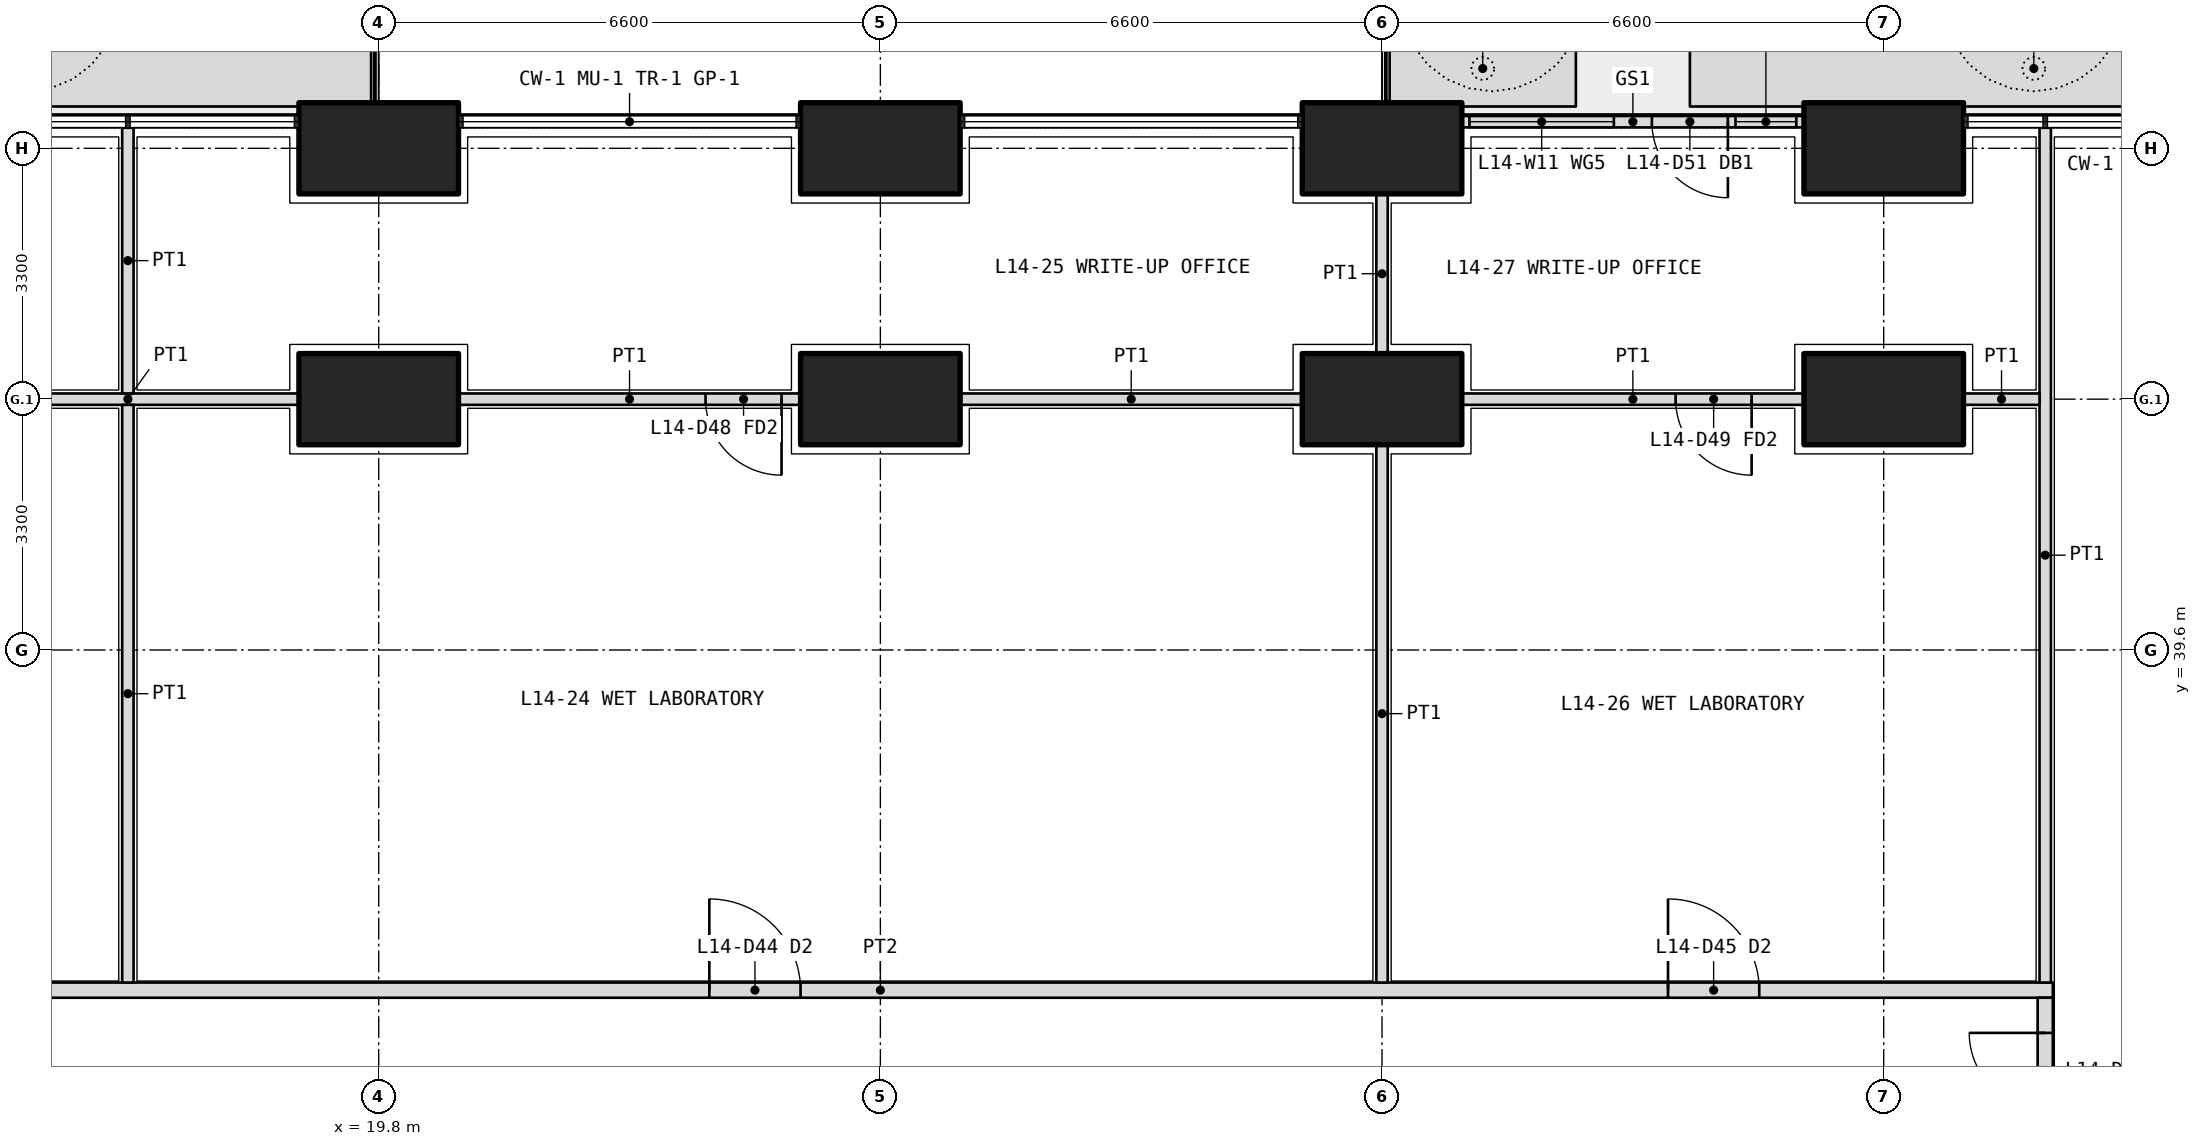
"""IFC4 building model, lengths in metres.
Left out: names, types, materials, properties, quantities, classifications, styles, units other than length and angle.
Written with IfcOpenShell. Run it as: python <this file> out.ifc"""

import sys

from ifc_helpers import new_model, si_unit, direction, frame, frame_2d, origin, origin_2d, place, context, subcontext, project, spatial, polyline, rectangle, outline, extrude, element, fill, save


model = new_model("IFC4")
c1 = context("Model", 3, precision=1e-05, world=origin(), true_north=direction((0.0, 1.0)))
c2 = subcontext(c1, "Body", "Model", "MODEL_VIEW")
j1 = project(units=[si_unit("LENGTHUNIT", "METRE"), si_unit("PLANEANGLEUNIT", "RADIAN")], contexts=[c1])
p1 = place(None, origin())
s1 = spatial("IfcSite", under=j1, at=p1, CompositionType="ELEMENT")
p2 = place(p1, origin())
s2 = spatial("IfcBuilding", under=s1, at=p2, CompositionType="ELEMENT")
p3 = place(p2, frame((0.0, 0.0, 63.3)))
s3 = spatial("IfcBuildingStorey", under=s2, at=p3, CompositionType="ELEMENT", Elevation=63.3)
for number, where, z_axis, x_axis in (
    (1, (19.8, 46.2, 0.0), (0.0, 0.0, 1.0), (1.0, 0.0, 0.0)),
    (2, (26.4, 46.2, 0.0), (0.0, 0.0, 1.0), (1.0, 0.0, 0.0)),
    (3, (33.0, 46.2, 0.0), (0.0, 0.0, 1.0), (1.0, 0.0, 0.0)),
    (4, (39.6, 46.2, 0.0), (0.0, 0.0, 1.0), (1.0, 0.0, 0.0)),
    (5, (19.8, 42.9, 0.0), (0.0, 0.0, 1.0), (1.0, 0.0, 0.0)),
    (6, (26.4, 42.9, 0.0), (0.0, 0.0, 1.0), (1.0, 0.0, 0.0)),
    (7, (33.0, 42.9, 0.0), (0.0, 0.0, 1.0), (1.0, 0.0, 0.0)),
    (8, (39.6, 42.9, 0.0), (0.0, 0.0, 1.0), (1.0, 0.0, 0.0)),
):
    element("IfcColumn", number, at=place(p3, frame(where, z_axis=z_axis, x_axis=x_axis)), inside=s3, PredefinedType="COLUMN", context=c2, shape_type="SweptSolid", body=[
        extrude(rectangle(XDim=2.1, YDim=1.2, at=origin_2d()), origin(), (0.0, 0.0, 1.0), 4.2),
    ])
p4 = place(p3, origin())
e9 = element("IfcWall", 9, at=p4, inside=s3, PredefinedType="USERDEFINED", context=c2, shape_type="SweptSolid", body=[
    extrude(outline(polyline([(10.65, 46.75), (19.7, 46.75), (19.7, 47.75), (10.65, 47.75), (10.65, 46.75)]), holes=[polyline([(10.8, 46.9), (19.55, 46.9), (19.55, 47.6), (10.8, 47.6), (10.8, 46.9)])]), origin(), (0.0, 0.0, 1.0), 1.05),
])
p5 = place(p3, origin())
e10 = element("IfcWall", 10, at=p5, inside=s3, PredefinedType="USERDEFINED", context=c2, shape_type="SweptSolid", body=[
    extrude(outline(polyline([(33.1, 46.75), (35.55, 46.75), (35.55, 47.75), (33.1, 47.75), (33.1, 46.75)]), holes=[polyline([(33.25, 46.9), (35.4, 46.9), (35.4, 47.6), (33.25, 47.6), (33.25, 46.9)])]), origin(), (0.0, 0.0, 1.0), 1.05),
])
p6 = place(p3, origin())
e11 = element("IfcWall", 11, at=p6, inside=s3, PredefinedType="USERDEFINED", context=c2, shape_type="SweptSolid", body=[
    extrude(outline(polyline([(37.05, 46.75), (46.1, 46.75), (46.1, 47.75), (37.05, 47.75), (37.05, 46.75)]), holes=[polyline([(37.2, 46.9), (45.95, 46.9), (45.95, 47.6), (37.2, 47.6), (37.2, 46.9)])]), origin(), (0.0, 0.0, 1.0), 1.05),
])
p7 = place(p3, frame((38.55, 46.55, 0.0), z_axis=(0.0, 0.0, 1.0), x_axis=(-1.0, 0.0, 0.0)))
e12 = element("IfcWall", 12, at=p7, inside=s3, PredefinedType="SOLIDWALL", context=c2, shape_type="SweptSolid", body=[
    extrude(rectangle(XDim=4.5, YDim=0.15, at=frame_2d((2.25, 0.0))), origin(), (0.0, 0.0, 1.0), 2.6),
])
p8 = place(p7, frame((1.0, 0.0, 0.0)))
e13 = element("IfcOpeningElement", 13, at=p8, cuts=e12, PredefinedType="OPENING", context=c2, shape_type="SweptSolid", body=[
    extrude(rectangle(XDim=1.0, YDim=2.4, at=frame_2d((0.5, 1.2))), frame((0.0, 0.085, 0.0), z_axis=(0.0, -1.0, 0.0), x_axis=(1.0, 0.0, 0.0)), (0.0, 0.0, 1.0), 0.17),
])
p9 = place(p7, frame((0.1, 0.0, 0.1)))
e14 = element("IfcOpeningElement", 14, at=p9, cuts=e12, PredefinedType="OPENING", context=c2, shape_type="SweptSolid", body=[
    extrude(rectangle(XDim=0.8, YDim=2.2, at=frame_2d((0.4, 1.1))), frame((0.0, 0.085, 0.0), z_axis=(0.0, -1.0, 0.0), x_axis=(1.0, 0.0, 0.0)), (0.0, 0.0, 1.0), 0.17),
])
p10 = place(p7, frame((2.5, 0.0, 0.1)))
e15 = element("IfcOpeningElement", 15, at=p10, cuts=e12, PredefinedType="OPENING", context=c2, shape_type="SweptSolid", body=[
    extrude(rectangle(XDim=1.9, YDim=2.2, at=frame_2d((0.95, 1.1))), frame((0.0, 0.085, 0.0), z_axis=(0.0, -1.0, 0.0), x_axis=(1.0, 0.0, 0.0)), (0.0, 0.0, 1.0), 0.17),
])
p11 = place(p3, frame((10.975, 35.125, 0.0), z_axis=(0.0, 0.0, 1.0), x_axis=(1.0, 0.0, 0.0)))
e16 = element("IfcWall", 16, at=p11, inside=s3, PredefinedType="PARTITIONING", context=c2, shape_type="SweptSolid", body=[
    extrude(rectangle(XDim=30.85, YDim=0.2, at=frame_2d((15.425, 0.0))), origin(), (0.0, 0.0, 1.0), 2.85),
])
p12 = place(p11, frame((2.312, 0.0, 0.0)))
e17 = element("IfcOpeningElement", 17, at=p12, cuts=e16, PredefinedType="OPENING", context=c2, shape_type="SweptSolid", body=[
    extrude(rectangle(XDim=1.0, YDim=2.1, at=frame_2d((0.5, 1.05))), frame((0.0, 0.11, 0.0), z_axis=(0.0, -1.0, 0.0), x_axis=(1.0, 0.0, 0.0)), (0.0, 0.0, 1.0), 0.22),
])
p13 = place(p11, frame((13.175, 0.0, 0.0)))
e18 = element("IfcOpeningElement", 18, at=p13, cuts=e16, PredefinedType="OPENING", context=c2, shape_type="SweptSolid", body=[
    extrude(rectangle(XDim=1.2, YDim=2.1, at=frame_2d((0.6, 1.05))), frame((0.0, 0.11, 0.0), z_axis=(0.0, -1.0, 0.0), x_axis=(1.0, 0.0, 0.0)), (0.0, 0.0, 1.0), 0.22),
])
p14 = place(p11, frame((25.788, 0.0, 0.0)))
e19 = element("IfcOpeningElement", 19, at=p14, cuts=e16, PredefinedType="OPENING", context=c2, shape_type="SweptSolid", body=[
    extrude(rectangle(XDim=1.2, YDim=2.1, at=frame_2d((0.6, 1.05))), frame((0.0, 0.11, 0.0), z_axis=(0.0, -1.0, 0.0), x_axis=(1.0, 0.0, 0.0)), (0.0, 0.0, 1.0), 0.22),
])
p15 = place(p3, frame((41.725, 19.8, 0.0), z_axis=(0.0, 0.0, 1.0), x_axis=(0.0, 1.0, 0.0)))
e20 = element("IfcWall", 20, at=p15, inside=s3, PredefinedType="PARTITIONING", context=c2, shape_type="SweptSolid", body=[
    extrude(rectangle(XDim=15.225, YDim=0.2, at=frame_2d((7.612, 0.0))), origin(), (0.0, 0.0, 1.0), 2.85),
])
p16 = place(p15, frame((1.0, 0.0, 0.0)))
e21 = element("IfcOpeningElement", 21, at=p16, cuts=e20, PredefinedType="OPENING", context=c2, shape_type="SweptSolid", body=[
    extrude(rectangle(XDim=1.0, YDim=2.1, at=frame_2d((0.5, 1.05))), frame((0.0, 0.11, 0.0), z_axis=(0.0, -1.0, 0.0), x_axis=(1.0, 0.0, 0.0)), (0.0, 0.0, 1.0), 0.22),
])
p17 = place(p15, frame((4.35, 0.0, 0.0)))
e22 = element("IfcOpeningElement", 22, at=p17, cuts=e20, PredefinedType="OPENING", context=c2, shape_type="SweptSolid", body=[
    extrude(rectangle(XDim=0.9, YDim=2.1, at=frame_2d((0.45, 1.05))), frame((0.0, 0.11, 0.0), z_axis=(0.0, -1.0, 0.0), x_axis=(1.0, 0.0, 0.0)), (0.0, 0.0, 1.0), 0.22),
])
p18 = place(p15, frame((9.3, 0.0, 0.0)))
e23 = element("IfcOpeningElement", 23, at=p18, cuts=e20, PredefinedType="OPENING", context=c2, shape_type="SweptSolid", body=[
    extrude(rectangle(XDim=1.2, YDim=2.1, at=frame_2d((0.6, 1.05))), frame((0.0, 0.11, 0.0), z_axis=(0.0, -1.0, 0.0), x_axis=(1.0, 0.0, 0.0)), (0.0, 0.0, 1.0), 0.22),
])
p19 = place(p15, frame((13.762, 0.0, 0.0)))
e24 = element("IfcOpeningElement", 24, at=p19, cuts=e20, PredefinedType="OPENING", context=c2, shape_type="SweptSolid", body=[
    extrude(rectangle(XDim=1.0, YDim=2.1, at=frame_2d((0.5, 1.05))), frame((0.0, 0.11, 0.0), z_axis=(0.0, -1.0, 0.0), x_axis=(1.0, 0.0, 0.0)), (0.0, 0.0, 1.0), 0.22),
])
p20 = place(p3, frame((41.725, 46.47, 0.0), z_axis=(0.0, 0.0, 1.0), x_axis=(0.0, -1.0, 0.0)))
e25 = element("IfcWall", 25, at=p20, inside=s3, PredefinedType="PARTITIONING", context=c2, shape_type="SweptSolid", body=[
    extrude(rectangle(XDim=11.245, YDim=0.15, at=frame_2d((5.623, 0.0))), origin(), (0.0, 0.0, 1.0), 2.6),
])
p21 = place(p3, frame((41.65, 42.9, 0.0), z_axis=(0.0, 0.0, 1.0), x_axis=(-1.0, 0.0, 0.0)))
e26 = element("IfcWall", 26, at=p21, inside=s3, PredefinedType="PARTITIONING", context=c2, shape_type="SweptSolid", body=[
    extrude(rectangle(XDim=1.0, YDim=0.15, at=frame_2d((0.5, 0.0))), origin(), (0.0, 0.0, 1.0), 3.9),
])
p22 = place(p3, frame((38.55, 42.9, 0.0), z_axis=(0.0, 0.0, 1.0), x_axis=(-1.0, 0.0, 0.0)))
e27 = element("IfcWall", 27, at=p22, inside=s3, PredefinedType="PARTITIONING", context=c2, shape_type="SweptSolid", body=[
    extrude(rectangle(XDim=4.5, YDim=0.15, at=frame_2d((2.25, 0.0))), origin(), (0.0, 0.0, 1.0), 3.9),
])
p23 = place(p22, frame((0.688, 0.0, 0.0)))
e28 = element("IfcOpeningElement", 28, at=p23, cuts=e27, PredefinedType="OPENING", context=c2, shape_type="SweptSolid", body=[
    extrude(rectangle(XDim=1.0, YDim=2.1, at=frame_2d((0.5, 1.05))), frame((0.0, 0.085, 0.0), z_axis=(0.0, -1.0, 0.0), x_axis=(1.0, 0.0, 0.0)), (0.0, 0.0, 1.0), 0.17),
])
p24 = place(p3, frame((31.95, 42.9, 0.0), z_axis=(0.0, 0.0, 1.0), x_axis=(-1.0, 0.0, 0.0)))
e29 = element("IfcWall", 29, at=p24, inside=s3, PredefinedType="PARTITIONING", context=c2, shape_type="SweptSolid", body=[
    extrude(rectangle(XDim=4.5, YDim=0.15, at=frame_2d((2.25, 0.0))), origin(), (0.0, 0.0, 1.0), 3.9),
])
p25 = place(p3, frame((25.35, 42.9, 0.0), z_axis=(0.0, 0.0, 1.0), x_axis=(-1.0, 0.0, 0.0)))
e30 = element("IfcWall", 30, at=p25, inside=s3, PredefinedType="PARTITIONING", context=c2, shape_type="SweptSolid", body=[
    extrude(rectangle(XDim=4.5, YDim=0.15, at=frame_2d((2.25, 0.0))), origin(), (0.0, 0.0, 1.0), 3.9),
])
p26 = place(p25, frame((0.25, 0.0, 0.0)))
e31 = element("IfcOpeningElement", 31, at=p26, cuts=e30, PredefinedType="OPENING", context=c2, shape_type="SweptSolid", body=[
    extrude(rectangle(XDim=1.0, YDim=2.1, at=frame_2d((0.5, 1.05))), frame((0.0, 0.085, 0.0), z_axis=(0.0, -1.0, 0.0), x_axis=(1.0, 0.0, 0.0)), (0.0, 0.0, 1.0), 0.17),
])
p27 = place(p3, frame((18.75, 42.9, 0.0), z_axis=(0.0, 0.0, 1.0), x_axis=(-1.0, 0.0, 0.0)))
e32 = element("IfcWall", 32, at=p27, inside=s3, PredefinedType="PARTITIONING", context=c2, shape_type="SweptSolid", body=[
    extrude(rectangle(XDim=4.5, YDim=0.15, at=frame_2d((2.25, 0.0))), origin(), (0.0, 0.0, 1.0), 3.9),
])
p28 = place(p3, frame((16.5, 46.47, 0.0), z_axis=(0.0, 0.0, 1.0), x_axis=(0.0, -1.0, 0.0)))
e33 = element("IfcWall", 33, at=p28, inside=s3, PredefinedType="PARTITIONING", context=c2, shape_type="SweptSolid", body=[
    extrude(rectangle(XDim=3.495, YDim=0.15, at=frame_2d((1.748, 0.0))), origin(), (0.0, 0.0, 1.0), 2.6),
])
p29 = place(p3, frame((16.5, 42.825, 0.0), z_axis=(0.0, 0.0, 1.0), x_axis=(0.0, -1.0, 0.0)))
e34 = element("IfcWall", 34, at=p29, inside=s3, PredefinedType="PARTITIONING", context=c2, shape_type="SweptSolid", body=[
    extrude(rectangle(XDim=7.6, YDim=0.15, at=frame_2d((3.8, 0.0))), origin(), (0.0, 0.0, 1.0), 3.9),
])
p30 = place(p3, frame((33.0, 45.6, 0.0), z_axis=(0.0, 0.0, 1.0), x_axis=(0.0, -1.0, 0.0)))
e35 = element("IfcWall", 35, at=p30, inside=s3, PredefinedType="PARTITIONING", context=c2, shape_type="SweptSolid", body=[
    extrude(rectangle(XDim=2.1, YDim=0.15, at=frame_2d((1.05, 0.0))), origin(), (0.0, 0.0, 1.0), 2.85),
])
p31 = place(p3, frame((33.0, 42.3, 0.0), z_axis=(0.0, 0.0, 1.0), x_axis=(0.0, -1.0, 0.0)))
e36 = element("IfcWall", 36, at=p31, inside=s3, PredefinedType="PARTITIONING", context=c2, shape_type="SweptSolid", body=[
    extrude(rectangle(XDim=7.075, YDim=0.15, at=frame_2d((3.538, 0.0))), origin(), (0.0, 0.0, 1.0), 2.85),
])
p32 = place(p8, origin())
e37 = element("IfcDoor", 37, at=p32, inside=s3, OperationType="SINGLE_SWING_LEFT", PredefinedType="DOOR", context=c2, shape_type="SweptSolid", body=[
    extrude(rectangle(XDim=1.0, YDim=2.4, at=frame_2d((0.5, 1.2))), frame((0.0, 0.025, 0.0), z_axis=(0.0, -1.0, 0.0), x_axis=(1.0, 0.0, 0.0)), (0.0, 0.0, 1.0), 0.05),
])
fill(e13, e37)
p33 = place(p9, origin())
e38 = element("IfcWindow", 38, at=p33, inside=s3, PartitioningType="SINGLE_PANEL", PredefinedType="WINDOW", context=c2, shape_type="SweptSolid", body=[
    extrude(rectangle(XDim=0.8, YDim=2.2, at=frame_2d((0.4, 1.1))), frame((0.0, 0.03, 0.0), z_axis=(0.0, -1.0, 0.0), x_axis=(1.0, 0.0, 0.0)), (0.0, 0.0, 1.0), 0.06),
])
fill(e14, e38)
p34 = place(p10, origin())
e39 = element("IfcWindow", 39, at=p34, inside=s3, PartitioningType="SINGLE_PANEL", PredefinedType="WINDOW", context=c2, shape_type="SweptSolid", body=[
    extrude(rectangle(XDim=1.9, YDim=2.2, at=frame_2d((0.95, 1.1))), frame((0.0, 0.03, 0.0), z_axis=(0.0, -1.0, 0.0), x_axis=(1.0, 0.0, 0.0)), (0.0, 0.0, 1.0), 0.06),
])
fill(e15, e39)
p35 = place(p19, origin())
e40 = element("IfcDoor", 40, at=p35, inside=s3, OperationType="SINGLE_SWING_RIGHT", PredefinedType="DOOR", context=c2, shape_type="SweptSolid", body=[
    extrude(rectangle(XDim=1.0, YDim=2.1, at=frame_2d((0.5, 1.05))), frame((0.0, 0.025, 0.0), z_axis=(0.0, -1.0, 0.0), x_axis=(1.0, 0.0, 0.0)), (0.0, 0.0, 1.0), 0.05),
])
fill(e24, e40)
p36 = place(p13, origin())
e41 = element("IfcDoor", 41, at=p36, inside=s3, OperationType="DOUBLE_DOOR_SINGLE_SWING", PredefinedType="DOOR", context=c2, shape_type="SweptSolid", body=[
    extrude(rectangle(XDim=1.2, YDim=2.1, at=frame_2d((0.6, 1.05))), frame((0.0, 0.025, 0.0), z_axis=(0.0, -1.0, 0.0), x_axis=(1.0, 0.0, 0.0)), (0.0, 0.0, 1.0), 0.05),
])
fill(e18, e41)
p37 = place(p26, origin())
e42 = element("IfcDoor", 42, at=p37, inside=s3, OperationType="SINGLE_SWING_LEFT", PredefinedType="DOOR", context=c2, shape_type="SweptSolid", body=[
    extrude(rectangle(XDim=1.0, YDim=2.1, at=frame_2d((0.5, 1.05))), frame((0.0, 0.025, 0.0), z_axis=(0.0, -1.0, 0.0), x_axis=(1.0, 0.0, 0.0)), (0.0, 0.0, 1.0), 0.05),
])
fill(e31, e42)
p38 = place(p14, origin())
e43 = element("IfcDoor", 43, at=p38, inside=s3, OperationType="DOUBLE_DOOR_SINGLE_SWING", PredefinedType="DOOR", context=c2, shape_type="SweptSolid", body=[
    extrude(rectangle(XDim=1.2, YDim=2.1, at=frame_2d((0.6, 1.05))), frame((0.0, 0.025, 0.0), z_axis=(0.0, -1.0, 0.0), x_axis=(1.0, 0.0, 0.0)), (0.0, 0.0, 1.0), 0.05),
])
fill(e19, e43)
p39 = place(p23, origin())
e44 = element("IfcDoor", 44, at=p39, inside=s3, OperationType="SINGLE_SWING_LEFT", PredefinedType="DOOR", context=c2, shape_type="SweptSolid", body=[
    extrude(rectangle(XDim=1.0, YDim=2.1, at=frame_2d((0.5, 1.05))), frame((0.0, 0.025, 0.0), z_axis=(0.0, -1.0, 0.0), x_axis=(1.0, 0.0, 0.0)), (0.0, 0.0, 1.0), 0.05),
])
fill(e28, e44)
save(model, sys.argv[1])
